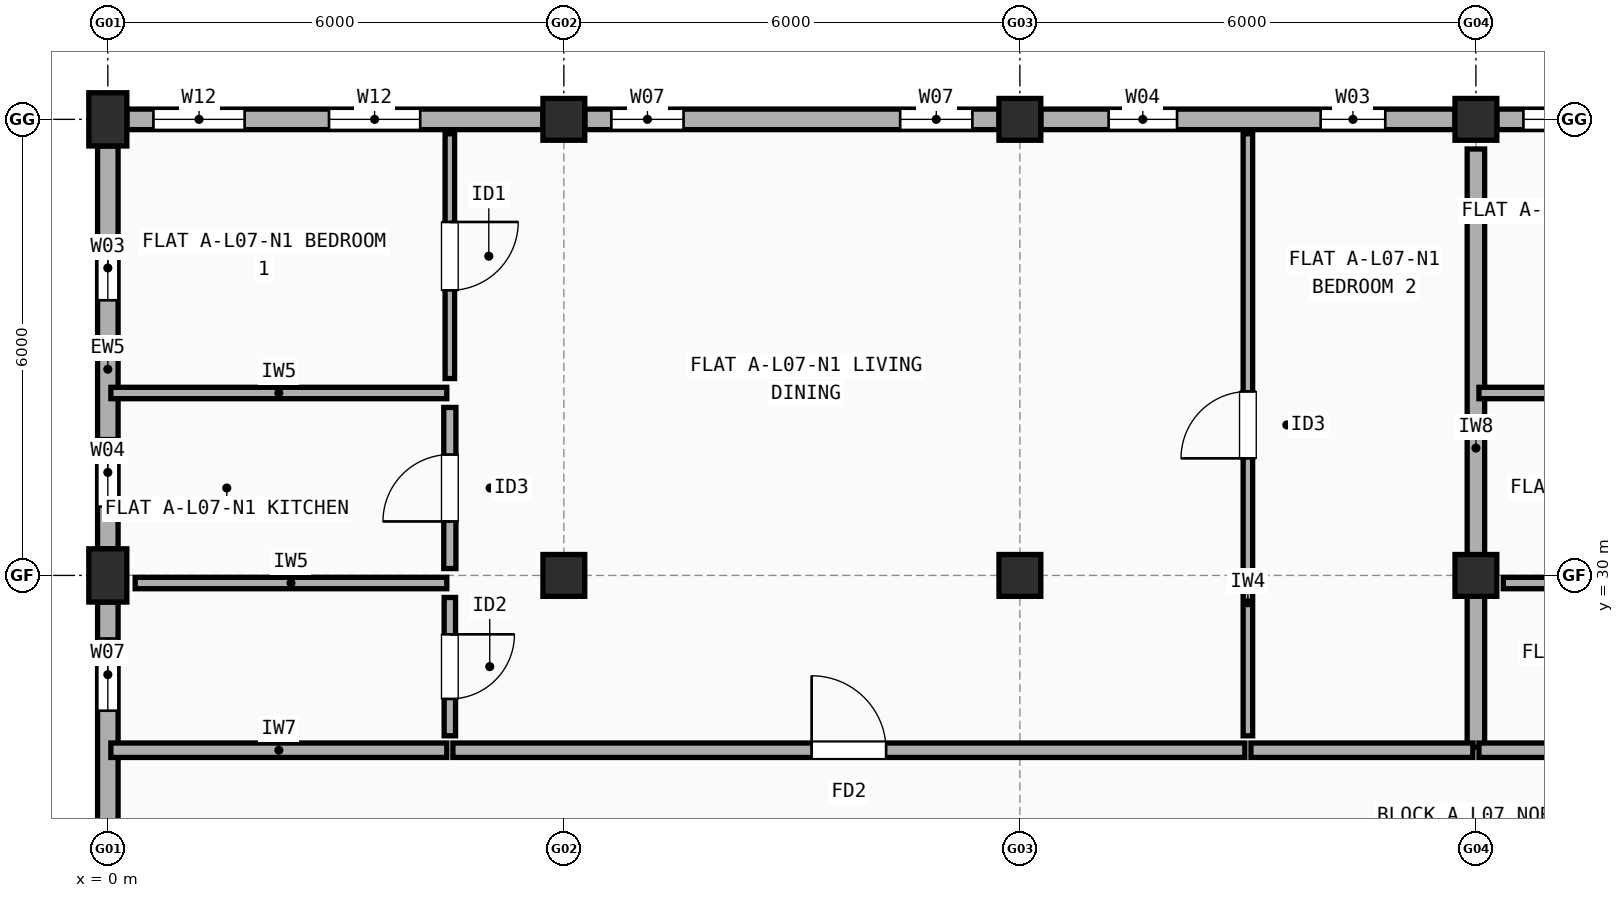
"""IFC4 building model, lengths in metres.
Left out: names, types, materials, properties, quantities, classifications, styles, units other than length and angle.
Written with IfcOpenShell. Run it as: python <this file> out.ifc"""

import sys

from ifc_helpers import new_model, si_unit, direction, frame, frame_2d, origin, origin_2d, place, context, subcontext, project, spatial, rectangle, extrude, element, fill, save


model = new_model("IFC4")
c1 = context("Model", 3, precision=1e-05, world=origin(), true_north=direction((0.0, 1.0)))
c2 = subcontext(c1, "Body", "Model", "MODEL_VIEW")
j1 = project(units=[si_unit("LENGTHUNIT", "METRE"), si_unit("PLANEANGLEUNIT", "RADIAN")], contexts=[c1])
p1 = place(None, origin())
s1 = spatial("IfcSite", under=j1, at=p1, CompositionType="ELEMENT")
p2 = place(p1, origin())
s2 = spatial("IfcBuilding", under=s1, at=p2, CompositionType="ELEMENT")
p3 = place(p2, frame((0.0, 0.0, 23.7)))
s3 = spatial("IfcBuildingStorey", under=s2, at=p3, CompositionType="ELEMENT", Elevation=23.7)
for number, where, z_axis, x_axis in (
    (1, (0.0, 30.0, 0.0), (0.0, 0.0, 1.0), (1.0, 0.0, 0.0)),
    (2, (0.0, 36.0, 0.0), (0.0, 0.0, 1.0), (1.0, 0.0, 0.0)),
):
    element("IfcColumn", number, at=place(p3, frame(where, z_axis=z_axis, x_axis=x_axis)), inside=s3, PredefinedType="COLUMN", context=c2, shape_type="SweptSolid", body=[
        extrude(rectangle(XDim=0.5, YDim=0.7, at=origin_2d()), origin(), (0.0, 0.0, 1.0), 2.975),
    ])
for number, where, z_axis, x_axis in (
    (3, (6.0, 30.0, 0.0), (0.0, 0.0, 1.0), (1.0, 0.0, 0.0)),
    (4, (6.0, 36.0, 0.0), (0.0, 0.0, 1.0), (1.0, 0.0, 0.0)),
    (5, (12.0, 30.0, 0.0), (0.0, 0.0, 1.0), (1.0, 0.0, 0.0)),
    (6, (12.0, 36.0, 0.0), (0.0, 0.0, 1.0), (1.0, 0.0, 0.0)),
    (7, (18.0, 30.0, 0.0), (0.0, 0.0, 1.0), (1.0, 0.0, 0.0)),
    (8, (18.0, 36.0, 0.0), (0.0, 0.0, 1.0), (1.0, 0.0, 0.0)),
):
    element("IfcColumn", number, at=place(p3, frame(where, z_axis=z_axis, x_axis=x_axis)), inside=s3, PredefinedType="COLUMN", context=c2, shape_type="SweptSolid", body=[
        extrude(rectangle(XDim=0.55, YDim=0.55, at=origin_2d()), origin(), (0.0, 0.0, 1.0), 2.975),
    ])
p4 = place(p3, frame((23.725, 36.0, 0.0), z_axis=(0.0, 0.0, 1.0), x_axis=(-1.0, 0.0, 0.0)))
e9 = element("IfcWall", 9, at=p4, inside=s3, PredefinedType="STANDARD", context=c2, shape_type="SweptSolid", body=[
    extrude(rectangle(XDim=5.45, YDim=0.27, at=frame_2d((2.725, 0.0))), origin(), (0.0, 0.0, 1.0), 2.457),
])
p5 = place(p4, frame((1.615, 0.0, 0.9)))
e10 = element("IfcOpeningElement", 10, at=p5, cuts=e9, PredefinedType="OPENING", context=c2, shape_type="SweptSolid", body=[
    extrude(rectangle(XDim=1.2, YDim=1.35, at=frame_2d((0.6, 0.675))), frame((0.0, 0.145, 0.0), z_axis=(0.0, -1.0, 0.0), x_axis=(1.0, 0.0, 0.0)), (0.0, 0.0, 1.0), 0.29),
])
p6 = place(p4, frame((3.9, 0.0, 0.9)))
e11 = element("IfcOpeningElement", 11, at=p6, cuts=e9, PredefinedType="OPENING", context=c2, shape_type="SweptSolid", body=[
    extrude(rectangle(XDim=1.2, YDim=1.35, at=frame_2d((0.6, 0.675))), frame((0.0, 0.145, 0.0), z_axis=(0.0, -1.0, 0.0), x_axis=(1.0, 0.0, 0.0)), (0.0, 0.0, 1.0), 0.29),
])
p7 = place(p3, frame((17.725, 36.0, 0.0), z_axis=(0.0, 0.0, 1.0), x_axis=(-1.0, 0.0, 0.0)))
e12 = element("IfcWall", 12, at=p7, inside=s3, PredefinedType="STANDARD", context=c2, shape_type="SweptSolid", body=[
    extrude(rectangle(XDim=5.45, YDim=0.27, at=frame_2d((2.725, 0.0))), origin(), (0.0, 0.0, 1.0), 2.457),
])
p8 = place(p7, frame((0.917, 0.0, 0.9)))
e13 = element("IfcOpeningElement", 13, at=p8, cuts=e12, PredefinedType="OPENING", context=c2, shape_type="SweptSolid", body=[
    extrude(rectangle(XDim=0.85, YDim=1.25, at=frame_2d((0.425, 0.625))), frame((0.0, 0.145, 0.0), z_axis=(0.0, -1.0, 0.0), x_axis=(1.0, 0.0, 0.0)), (0.0, 0.0, 1.0), 0.29),
])
p9 = place(p7, frame((3.657, 0.0, 0.9)))
e14 = element("IfcOpeningElement", 14, at=p9, cuts=e12, PredefinedType="OPENING", context=c2, shape_type="SweptSolid", body=[
    extrude(rectangle(XDim=0.9, YDim=1.3, at=frame_2d((0.45, 0.65))), frame((0.0, 0.145, 0.0), z_axis=(0.0, -1.0, 0.0), x_axis=(1.0, 0.0, 0.0)), (0.0, 0.0, 1.0), 0.29),
])
p10 = place(p3, frame((11.725, 36.0, 0.0), z_axis=(0.0, 0.0, 1.0), x_axis=(-1.0, 0.0, 0.0)))
e15 = element("IfcWall", 15, at=p10, inside=s3, PredefinedType="STANDARD", context=c2, shape_type="SweptSolid", body=[
    extrude(rectangle(XDim=5.45, YDim=0.27, at=frame_2d((2.725, 0.0))), origin(), (0.0, 0.0, 1.0), 2.457),
])
p11 = place(p10, frame((0.35, 0.0, 0.9)))
e16 = element("IfcOpeningElement", 16, at=p11, cuts=e15, PredefinedType="OPENING", context=c2, shape_type="SweptSolid", body=[
    extrude(rectangle(XDim=0.95, YDim=1.35, at=frame_2d((0.475, 0.675))), frame((0.0, 0.145, 0.0), z_axis=(0.0, -1.0, 0.0), x_axis=(1.0, 0.0, 0.0)), (0.0, 0.0, 1.0), 0.29),
])
p12 = place(p10, frame((4.15, 0.0, 0.9)))
e17 = element("IfcOpeningElement", 17, at=p12, cuts=e15, PredefinedType="OPENING", context=c2, shape_type="SweptSolid", body=[
    extrude(rectangle(XDim=0.95, YDim=1.35, at=frame_2d((0.475, 0.675))), frame((0.0, 0.145, 0.0), z_axis=(0.0, -1.0, 0.0), x_axis=(1.0, 0.0, 0.0)), (0.0, 0.0, 1.0), 0.29),
])
p13 = place(p3, frame((5.725, 36.0, 0.0), z_axis=(0.0, 0.0, 1.0), x_axis=(-1.0, 0.0, 0.0)))
e18 = element("IfcWall", 18, at=p13, inside=s3, PredefinedType="STANDARD", context=c2, shape_type="SweptSolid", body=[
    extrude(rectangle(XDim=5.475, YDim=0.27, at=frame_2d((2.738, 0.0))), origin(), (0.0, 0.0, 1.0), 2.457),
])
p14 = place(p13, frame((1.615, 0.0, 0.9)))
e19 = element("IfcOpeningElement", 19, at=p14, cuts=e18, PredefinedType="OPENING", context=c2, shape_type="SweptSolid", body=[
    extrude(rectangle(XDim=1.2, YDim=1.35, at=frame_2d((0.6, 0.675))), frame((0.0, 0.145, 0.0), z_axis=(0.0, -1.0, 0.0), x_axis=(1.0, 0.0, 0.0)), (0.0, 0.0, 1.0), 0.29),
])
p15 = place(p13, frame((3.925, 0.0, 0.9)))
e20 = element("IfcOpeningElement", 20, at=p15, cuts=e18, PredefinedType="OPENING", context=c2, shape_type="SweptSolid", body=[
    extrude(rectangle(XDim=1.2, YDim=1.35, at=frame_2d((0.6, 0.675))), frame((0.0, 0.145, 0.0), z_axis=(0.0, -1.0, 0.0), x_axis=(1.0, 0.0, 0.0)), (0.0, 0.0, 1.0), 0.29),
])
p16 = place(p3, frame((0.0, 35.65, 0.0), z_axis=(0.0, 0.0, 1.0), x_axis=(0.0, -1.0, 0.0)))
e21 = element("IfcWall", 21, at=p16, inside=s3, PredefinedType="STANDARD", context=c2, shape_type="SweptSolid", body=[
    extrude(rectangle(XDim=5.3, YDim=0.27, at=frame_2d((2.65, 0.0))), origin(), (0.0, 0.0, 1.0), 2.457),
])
p17 = place(p16, frame((1.18, 0.0, 0.9)))
e22 = element("IfcOpeningElement", 22, at=p17, cuts=e21, PredefinedType="OPENING", context=c2, shape_type="SweptSolid", body=[
    extrude(rectangle(XDim=0.85, YDim=1.25, at=frame_2d((0.425, 0.625))), frame((0.0, 0.145, 0.0), z_axis=(0.0, -1.0, 0.0), x_axis=(1.0, 0.0, 0.0)), (0.0, 0.0, 1.0), 0.29),
])
p18 = place(p16, frame((3.845, 0.0, 0.9)))
e23 = element("IfcOpeningElement", 23, at=p18, cuts=e21, PredefinedType="OPENING", context=c2, shape_type="SweptSolid", body=[
    extrude(rectangle(XDim=0.9, YDim=1.3, at=frame_2d((0.45, 0.65))), frame((0.0, 0.145, 0.0), z_axis=(0.0, -1.0, 0.0), x_axis=(1.0, 0.0, 0.0)), (0.0, 0.0, 1.0), 0.29),
])
p19 = place(p3, frame((0.0, 29.65, 0.0), z_axis=(0.0, 0.0, 1.0), x_axis=(0.0, -1.0, 0.0)))
e24 = element("IfcWall", 24, at=p19, inside=s3, PredefinedType="STANDARD", context=c2, shape_type="SweptSolid", body=[
    extrude(rectangle(XDim=5.3, YDim=0.27, at=frame_2d((2.65, 0.0))), origin(), (0.0, 0.0, 1.0), 2.457),
])
p20 = place(p19, frame((0.48, 0.0, 0.9)))
e25 = element("IfcOpeningElement", 25, at=p20, cuts=e24, PredefinedType="OPENING", context=c2, shape_type="SweptSolid", body=[
    extrude(rectangle(XDim=0.95, YDim=1.35, at=frame_2d((0.475, 0.675))), frame((0.0, 0.145, 0.0), z_axis=(0.0, -1.0, 0.0), x_axis=(1.0, 0.0, 0.0)), (0.0, 0.0, 1.0), 0.29),
])
p21 = place(p19, frame((3.12, 0.0, 0.9)))
e26 = element("IfcOpeningElement", 26, at=p21, cuts=e24, PredefinedType="OPENING", context=c2, shape_type="SweptSolid", body=[
    extrude(rectangle(XDim=1.05, YDim=1.35, at=frame_2d((0.525, 0.675))), frame((0.0, 0.145, 0.0), z_axis=(0.0, -1.0, 0.0), x_axis=(1.0, 0.0, 0.0)), (0.0, 0.0, 1.0), 0.29),
])
p22 = place(p3, frame((18.0, 27.74, 0.0), z_axis=(0.0, 0.0, 1.0), x_axis=(0.0, 1.0, 0.0)))
e27 = element("IfcWall", 27, at=p22, inside=s3, PredefinedType="SOLIDWALL", context=c2, shape_type="SweptSolid", body=[
    extrude(rectangle(XDim=7.87, YDim=0.23, at=frame_2d((3.935, 0.0))), origin(), (0.0, 0.0, 1.0), 2.508),
])
p23 = place(p3, frame((0.04, 27.7, 0.0), z_axis=(0.0, 0.0, 1.0), x_axis=(1.0, 0.0, 0.0)))
e28 = element("IfcWall", 28, at=p23, inside=s3, PredefinedType="SOLIDWALL", context=c2, shape_type="SweptSolid", body=[
    extrude(rectangle(XDim=4.42, YDim=0.19, at=frame_2d((2.21, 0.0))), origin(), (0.0, 0.0, 1.0), 2.457),
])
p24 = place(p3, frame((4.54, 27.7, 0.0), z_axis=(0.0, 0.0, 1.0), x_axis=(1.0, 0.0, 0.0)))
e29 = element("IfcWall", 29, at=p24, inside=s3, PredefinedType="SOLIDWALL", context=c2, shape_type="SweptSolid", body=[
    extrude(rectangle(XDim=10.42, YDim=0.19, at=frame_2d((5.21, 0.0))), origin(), (0.0, 0.0, 1.0), 2.508),
])
p25 = place(p24, frame((4.72, 0.0, 0.0)))
e30 = element("IfcOpeningElement", 30, at=p25, cuts=e29, PredefinedType="OPENING", context=c2, shape_type="SweptSolid", body=[
    extrude(rectangle(XDim=0.98, YDim=2.15, at=frame_2d((0.49, 1.075))), frame((0.0, 0.105, 0.0), z_axis=(0.0, -1.0, 0.0), x_axis=(1.0, 0.0, 0.0)), (0.0, 0.0, 1.0), 0.21),
])
p26 = place(p3, frame((4.5, 32.59, 0.0), z_axis=(0.0, 0.0, 1.0), x_axis=(0.0, 1.0, 0.0)))
e31 = element("IfcWall", 31, at=p26, inside=s3, PredefinedType="PARTITIONING", context=c2, shape_type="SweptSolid", body=[
    extrude(rectangle(XDim=3.22, YDim=0.125, at=frame_2d((1.61, 0.0))), origin(), (0.0, 0.0, 1.0), 2.975),
])
p27 = place(p26, frame((1.16, 0.0, 0.0)))
e32 = element("IfcOpeningElement", 32, at=p27, cuts=e31, PredefinedType="OPENING", context=c2, shape_type="SweptSolid", body=[
    extrude(rectangle(XDim=0.9, YDim=2.1, at=frame_2d((0.45, 1.05))), frame((0.0, 0.073, 0.0), z_axis=(0.0, -1.0, 0.0), x_axis=(1.0, 0.0, 0.0)), (0.0, 0.0, 1.0), 0.145),
])
p28 = place(p3, frame((4.5, 30.09, 0.0), z_axis=(0.0, 0.0, 1.0), x_axis=(0.0, 1.0, 0.0)))
e33 = element("IfcWall", 33, at=p28, inside=s3, PredefinedType="PLUMBINGWALL", context=c2, shape_type="SweptSolid", body=[
    extrude(rectangle(XDim=2.12, YDim=0.16, at=frame_2d((1.06, 0.0))), origin(), (0.0, 0.0, 1.0), 2.457),
])
p29 = place(p28, frame((0.62, 0.0, 0.0)))
e34 = element("IfcOpeningElement", 34, at=p29, cuts=e33, PredefinedType="OPENING", context=c2, shape_type="SweptSolid", body=[
    extrude(rectangle(XDim=0.88, YDim=2.1, at=frame_2d((0.44, 1.05))), frame((0.0, 0.09, 0.0), z_axis=(0.0, -1.0, 0.0), x_axis=(1.0, 0.0, 0.0)), (0.0, 0.0, 1.0), 0.18),
])
p30 = place(p3, frame((4.5, 27.89, 0.0), z_axis=(0.0, 0.0, 1.0), x_axis=(0.0, 1.0, 0.0)))
e35 = element("IfcWall", 35, at=p30, inside=s3, PredefinedType="PARTITIONING", context=c2, shape_type="SweptSolid", body=[
    extrude(rectangle(XDim=1.82, YDim=0.15, at=frame_2d((0.91, 0.0))), origin(), (0.0, 0.0, 1.0), 2.975),
])
p31 = place(p30, frame((0.485, 0.0, 0.0)))
e36 = element("IfcOpeningElement", 36, at=p31, cuts=e35, PredefinedType="OPENING", context=c2, shape_type="SweptSolid", body=[
    extrude(rectangle(XDim=0.85, YDim=2.1, at=frame_2d((0.425, 1.05))), frame((0.0, 0.085, 0.0), z_axis=(0.0, -1.0, 0.0), x_axis=(1.0, 0.0, 0.0)), (0.0, 0.0, 1.0), 0.17),
])
p32 = place(p3, frame((0.04, 32.4, 0.0), z_axis=(0.0, 0.0, 1.0), x_axis=(1.0, 0.0, 0.0)))
e37 = element("IfcWall", 37, at=p32, inside=s3, PredefinedType="PARTITIONING", context=c2, shape_type="SweptSolid", body=[
    extrude(rectangle(XDim=4.42, YDim=0.15, at=frame_2d((2.21, 0.0))), origin(), (0.0, 0.0, 1.0), 2.457),
])
p33 = place(p3, frame((0.36, 29.9, 0.0), z_axis=(0.0, 0.0, 1.0), x_axis=(1.0, 0.0, 0.0)))
e38 = element("IfcWall", 38, at=p33, inside=s3, PredefinedType="PARTITIONING", context=c2, shape_type="SweptSolid", body=[
    extrude(rectangle(XDim=4.1, YDim=0.15, at=frame_2d((2.05, 0.0))), origin(), (0.0, 0.0, 1.0), 2.457),
])
p34 = place(p3, frame((15.04, 27.7, 0.0), z_axis=(0.0, 0.0, 1.0), x_axis=(1.0, 0.0, 0.0)))
e39 = element("IfcWall", 39, at=p34, inside=s3, PredefinedType="SOLIDWALL", context=c2, shape_type="SweptSolid", body=[
    extrude(rectangle(XDim=2.92, YDim=0.19, at=frame_2d((1.46, 0.0))), origin(), (0.0, 0.0, 1.0), 2.975),
])
p35 = place(p3, frame((15.0, 27.89, 0.0), z_axis=(0.0, 0.0, 1.0), x_axis=(0.0, 1.0, 0.0)))
e40 = element("IfcWall", 40, at=p35, inside=s3, PredefinedType="PARTITIONING", context=c2, shape_type="SweptSolid", body=[
    extrude(rectangle(XDim=7.92, YDim=0.125, at=frame_2d((3.96, 0.0))), origin(), (0.0, 0.0, 1.0), 2.457),
])
p36 = place(p35, frame((3.65, 0.0, 0.0)))
e41 = element("IfcOpeningElement", 41, at=p36, cuts=e40, PredefinedType="OPENING", context=c2, shape_type="SweptSolid", body=[
    extrude(rectangle(XDim=0.88, YDim=2.1, at=frame_2d((0.44, 1.05))), frame((0.0, 0.073, 0.0), z_axis=(0.0, -1.0, 0.0), x_axis=(1.0, 0.0, 0.0)), (0.0, 0.0, 1.0), 0.145),
])
p37 = place(p3, frame((18.04, 27.7, 0.0), z_axis=(0.0, 0.0, 1.0), x_axis=(1.0, 0.0, 0.0)))
e42 = element("IfcWall", 42, at=p37, inside=s3, PredefinedType="SOLIDWALL", context=c2, shape_type="SweptSolid", body=[
    extrude(rectangle(XDim=4.42, YDim=0.19, at=frame_2d((2.21, 0.0))), origin(), (0.0, 0.0, 1.0), 2.975),
])
p38 = place(p3, frame((18.04, 32.4, 0.0), z_axis=(0.0, 0.0, 1.0), x_axis=(1.0, 0.0, 0.0)))
e43 = element("IfcWall", 43, at=p38, inside=s3, PredefinedType="PARTITIONING", context=c2, shape_type="SweptSolid", body=[
    extrude(rectangle(XDim=4.42, YDim=0.15, at=frame_2d((2.21, 0.0))), origin(), (0.0, 0.0, 1.0), 2.508),
])
p39 = place(p3, frame((18.36, 29.9, 0.0), z_axis=(0.0, 0.0, 1.0), x_axis=(1.0, 0.0, 0.0)))
e44 = element("IfcWall", 44, at=p39, inside=s3, PredefinedType="PARTITIONING", context=c2, shape_type="SweptSolid", body=[
    extrude(rectangle(XDim=4.1, YDim=0.15, at=frame_2d((2.05, 0.0))), origin(), (0.0, 0.0, 1.0), 2.457),
])
p40 = place(p6, origin())
e45 = element("IfcWindow", 45, at=p40, inside=s3, PartitioningType="SINGLE_PANEL", PredefinedType="WINDOW", context=c2, shape_type="SweptSolid", body=[
    extrude(rectangle(XDim=1.2, YDim=1.35, at=frame_2d((0.6, 0.675))), frame((0.0, 0.03, 0.0), z_axis=(0.0, -1.0, 0.0), x_axis=(1.0, 0.0, 0.0)), (0.0, 0.0, 1.0), 0.06),
])
fill(e11, e45)
p41 = place(p8, origin())
e46 = element("IfcWindow", 46, at=p41, inside=s3, PartitioningType="SINGLE_PANEL", PredefinedType="WINDOW", context=c2, shape_type="SweptSolid", body=[
    extrude(rectangle(XDim=0.85, YDim=1.25, at=frame_2d((0.425, 0.625))), frame((0.0, 0.03, 0.0), z_axis=(0.0, -1.0, 0.0), x_axis=(1.0, 0.0, 0.0)), (0.0, 0.0, 1.0), 0.06),
])
fill(e13, e46)
p42 = place(p9, origin())
e47 = element("IfcWindow", 47, at=p42, inside=s3, PartitioningType="SINGLE_PANEL", PredefinedType="WINDOW", context=c2, shape_type="SweptSolid", body=[
    extrude(rectangle(XDim=0.9, YDim=1.3, at=frame_2d((0.45, 0.65))), frame((0.0, 0.03, 0.0), z_axis=(0.0, -1.0, 0.0), x_axis=(1.0, 0.0, 0.0)), (0.0, 0.0, 1.0), 0.06),
])
fill(e14, e47)
p43 = place(p11, origin())
e48 = element("IfcWindow", 48, at=p43, inside=s3, PartitioningType="SINGLE_PANEL", PredefinedType="WINDOW", context=c2, shape_type="SweptSolid", body=[
    extrude(rectangle(XDim=0.95, YDim=1.35, at=frame_2d((0.475, 0.675))), frame((0.0, 0.03, 0.0), z_axis=(0.0, -1.0, 0.0), x_axis=(1.0, 0.0, 0.0)), (0.0, 0.0, 1.0), 0.06),
])
fill(e16, e48)
p44 = place(p12, origin())
e49 = element("IfcWindow", 49, at=p44, inside=s3, PartitioningType="SINGLE_PANEL", PredefinedType="WINDOW", context=c2, shape_type="SweptSolid", body=[
    extrude(rectangle(XDim=0.95, YDim=1.35, at=frame_2d((0.475, 0.675))), frame((0.0, 0.03, 0.0), z_axis=(0.0, -1.0, 0.0), x_axis=(1.0, 0.0, 0.0)), (0.0, 0.0, 1.0), 0.06),
])
fill(e17, e49)
p45 = place(p14, origin())
e50 = element("IfcWindow", 50, at=p45, inside=s3, PartitioningType="SINGLE_PANEL", PredefinedType="WINDOW", context=c2, shape_type="SweptSolid", body=[
    extrude(rectangle(XDim=1.2, YDim=1.35, at=frame_2d((0.6, 0.675))), frame((0.0, 0.03, 0.0), z_axis=(0.0, -1.0, 0.0), x_axis=(1.0, 0.0, 0.0)), (0.0, 0.0, 1.0), 0.06),
])
fill(e19, e50)
p46 = place(p15, origin())
e51 = element("IfcWindow", 51, at=p46, inside=s3, PartitioningType="SINGLE_PANEL", PredefinedType="WINDOW", context=c2, shape_type="SweptSolid", body=[
    extrude(rectangle(XDim=1.2, YDim=1.35, at=frame_2d((0.6, 0.675))), frame((0.0, 0.03, 0.0), z_axis=(0.0, -1.0, 0.0), x_axis=(1.0, 0.0, 0.0)), (0.0, 0.0, 1.0), 0.06),
])
fill(e20, e51)
p47 = place(p17, origin())
e52 = element("IfcWindow", 52, at=p47, inside=s3, PartitioningType="SINGLE_PANEL", PredefinedType="WINDOW", context=c2, shape_type="SweptSolid", body=[
    extrude(rectangle(XDim=0.85, YDim=1.25, at=frame_2d((0.425, 0.625))), frame((0.0, 0.03, 0.0), z_axis=(0.0, -1.0, 0.0), x_axis=(1.0, 0.0, 0.0)), (0.0, 0.0, 1.0), 0.06),
])
fill(e22, e52)
p48 = place(p18, origin())
e53 = element("IfcWindow", 53, at=p48, inside=s3, PartitioningType="SINGLE_PANEL", PredefinedType="WINDOW", context=c2, shape_type="SweptSolid", body=[
    extrude(rectangle(XDim=0.9, YDim=1.3, at=frame_2d((0.45, 0.65))), frame((0.0, 0.03, 0.0), z_axis=(0.0, -1.0, 0.0), x_axis=(1.0, 0.0, 0.0)), (0.0, 0.0, 1.0), 0.06),
])
fill(e23, e53)
p49 = place(p20, origin())
e54 = element("IfcWindow", 54, at=p49, inside=s3, PartitioningType="SINGLE_PANEL", PredefinedType="WINDOW", context=c2, shape_type="SweptSolid", body=[
    extrude(rectangle(XDim=0.95, YDim=1.35, at=frame_2d((0.475, 0.675))), frame((0.0, 0.03, 0.0), z_axis=(0.0, -1.0, 0.0), x_axis=(1.0, 0.0, 0.0)), (0.0, 0.0, 1.0), 0.06),
])
fill(e25, e54)
p50 = place(p25, origin())
e55 = element("IfcDoor", 55, at=p50, inside=s3, OperationType="SINGLE_SWING_LEFT", PredefinedType="DOOR", context=c2, shape_type="SweptSolid", body=[
    extrude(rectangle(XDim=0.98, YDim=2.15, at=frame_2d((0.49, 1.075))), frame((0.0, 0.025, 0.0), z_axis=(0.0, -1.0, 0.0), x_axis=(1.0, 0.0, 0.0)), (0.0, 0.0, 1.0), 0.05),
])
fill(e30, e55)
p51 = place(p27, origin())
e56 = element("IfcDoor", 56, at=p51, inside=s3, OperationType="SINGLE_SWING_RIGHT", PredefinedType="DOOR", context=c2, shape_type="SweptSolid", body=[
    extrude(rectangle(XDim=0.9, YDim=2.1, at=frame_2d((0.45, 1.05))), frame((0.0, 0.025, 0.0), z_axis=(0.0, -1.0, 0.0), x_axis=(1.0, 0.0, 0.0)), (0.0, 0.0, 1.0), 0.05),
])
fill(e32, e56)
p52 = place(p29, origin())
e57 = element("IfcDoor", 57, at=p52, inside=s3, OperationType="SINGLE_SWING_LEFT", PredefinedType="DOOR", context=c2, shape_type="SweptSolid", body=[
    extrude(rectangle(XDim=0.88, YDim=2.1, at=frame_2d((0.44, 1.05))), frame((0.0, 0.025, 0.0), z_axis=(0.0, -1.0, 0.0), x_axis=(1.0, 0.0, 0.0)), (0.0, 0.0, 1.0), 0.05),
])
fill(e34, e57)
p53 = place(p31, origin())
e58 = element("IfcDoor", 58, at=p53, inside=s3, OperationType="SINGLE_SWING_RIGHT", PredefinedType="DOOR", context=c2, shape_type="SweptSolid", body=[
    extrude(rectangle(XDim=0.85, YDim=2.1, at=frame_2d((0.425, 1.05))), frame((0.0, 0.025, 0.0), z_axis=(0.0, -1.0, 0.0), x_axis=(1.0, 0.0, 0.0)), (0.0, 0.0, 1.0), 0.05),
])
fill(e36, e58)
p54 = place(p36, origin())
e59 = element("IfcDoor", 59, at=p54, inside=s3, OperationType="SINGLE_SWING_LEFT", PredefinedType="DOOR", context=c2, shape_type="SweptSolid", body=[
    extrude(rectangle(XDim=0.88, YDim=2.1, at=frame_2d((0.44, 1.05))), frame((0.0, 0.025, 0.0), z_axis=(0.0, -1.0, 0.0), x_axis=(1.0, 0.0, 0.0)), (0.0, 0.0, 1.0), 0.05),
])
fill(e41, e59)
save(model, sys.argv[1])
